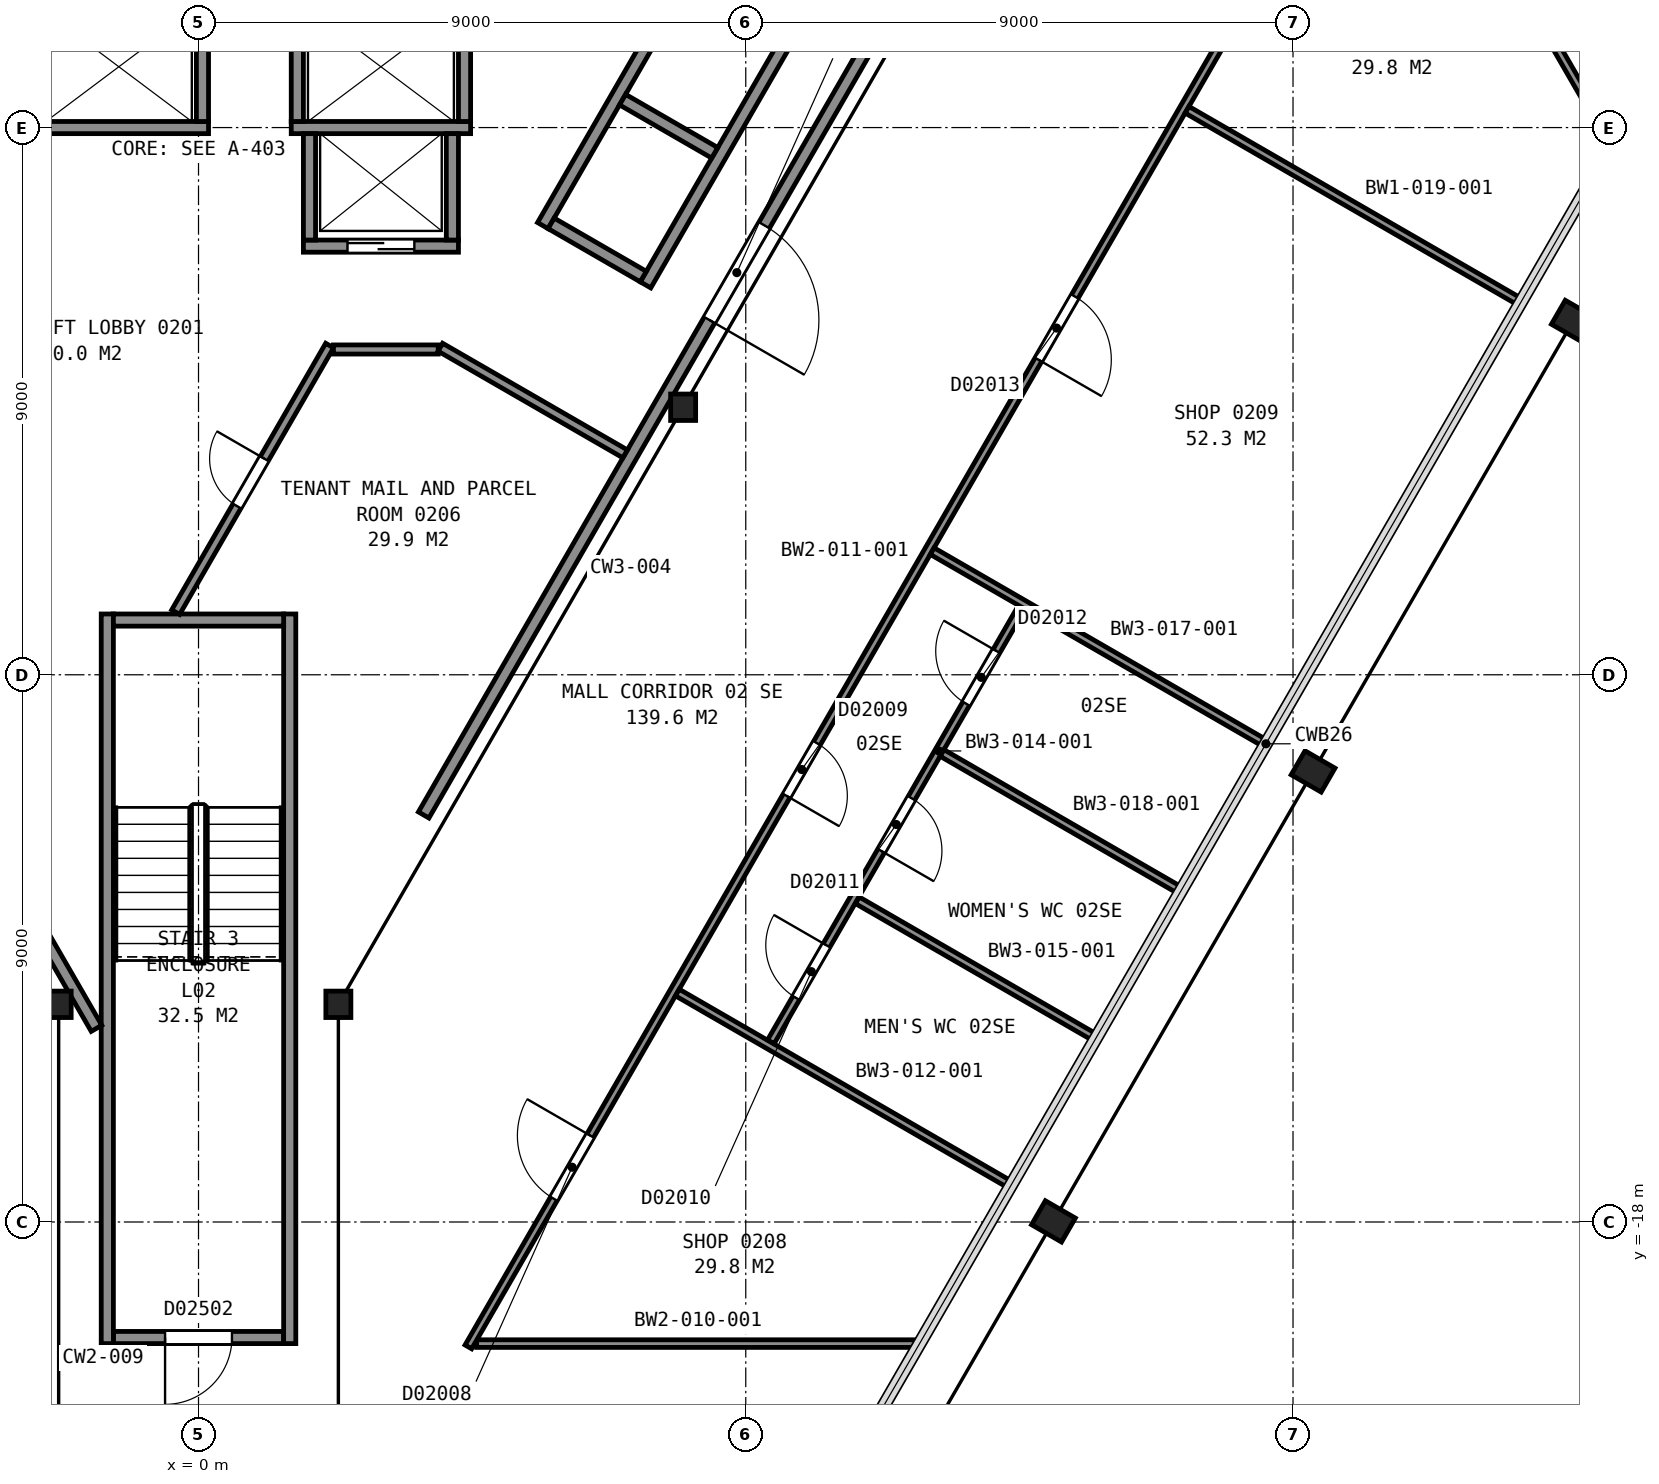
"""IFC4 building model, lengths in metres.
Left out: names, types, materials, properties, quantities, classifications, styles, units other than length and angle.
Written with IfcOpenShell. Run it as: python <this file> out.ifc"""

import sys

from ifc_helpers import new_model, si_unit, direction, frame, frame_2d, origin, origin_2d, place, context, subcontext, project, spatial, rectangle, i_section, extrude, element, fill, save


model = new_model("IFC4")
c1 = context("Model", 3, precision=1e-05, world=origin(), true_north=direction((0.0, 1.0)))
c2 = subcontext(c1, "Body", "Model", "MODEL_VIEW")
j1 = project(units=[si_unit("LENGTHUNIT", "METRE"), si_unit("PLANEANGLEUNIT", "RADIAN")], contexts=[c1])
p1 = place(None, origin())
s1 = spatial("IfcSite", under=j1, at=p1, CompositionType="ELEMENT")
p2 = place(p1, origin())
s2 = spatial("IfcBuilding", under=s1, at=p2, CompositionType="ELEMENT")
p3 = place(p2, frame((0.0, 0.0, 17.4)))
s3 = spatial("IfcBuildingStorey", under=s2, at=p3, CompositionType="ELEMENT", Elevation=17.4)
for number, where, z_axis, x_axis in (
    (1, (14.06, -17.99, -0.16), (0.0, 0.0, 1.0), (-0.5, -0.866, 0.0)),
    (2, (18.33, -10.59, -0.16), (0.0, 0.0, 1.0), (-0.5, -0.866, 0.0)),
    (3, (22.61, -3.18, -0.16), (0.0, 0.0, 1.0), (-0.5, -0.866, 0.0)),
):
    element("IfcColumn", number, at=place(p3, frame(where, z_axis=z_axis, x_axis=x_axis)), inside=s3, PredefinedType="COLUMN", context=c2, shape_type="SweptSolid", body=[
        extrude(i_section(OverallWidth=0.455, OverallDepth=0.569, WebThickness=0.078, FlangeThickness=0.125, FilletRadius=0.015, at=origin_2d()), origin(), (0.0, 0.0, 1.0), 5.16),
    ])
for number, where, z_axis, x_axis in (
    (4, (-2.3, -14.42, 0.0), (0.0, 0.0, 1.0), (1.0, 0.0, 0.0)),
    (5, (2.3, -14.42, 0.0), (0.0, 0.0, 1.0), (1.0, 0.0, 0.0)),
    (6, (7.97, -4.6, 0.0), (0.0, 0.0, 1.0), (1.0, 0.0, 0.0)),
):
    element("IfcColumn", number, at=place(p3, frame(where, z_axis=z_axis, x_axis=x_axis)), inside=s3, PredefinedType="COLUMN", context=c2, shape_type="SweptSolid", body=[
        extrude(i_section(OverallWidth=0.411, OverallDepth=0.434, WebThickness=0.036, FlangeThickness=0.057, FilletRadius=0.015, at=origin_2d()), origin(), (0.0, 0.0, 1.0), 5.0),
    ])
p4 = place(p3, frame((-1.4, -19.9, 0.0), z_axis=(0.0, 0.0, 1.0), x_axis=(1.0, 0.0, 0.0)))
e7 = element("IfcWall", 7, at=p4, inside=s3, PredefinedType="PARTITIONING", context=c2, shape_type="SweptSolid", body=[
    extrude(rectangle(XDim=2.8, YDim=0.2, at=frame_2d((1.4, 0.0))), origin(), (0.0, 0.0, 1.0), 4.75),
])
p5 = place(p4, frame((0.85, 0.0, 0.0)))
e8 = element("IfcOpeningElement", 8, at=p5, cuts=e7, PredefinedType="OPENING", context=c2, shape_type="SweptSolid", body=[
    extrude(rectangle(XDim=1.1, YDim=2.1, at=frame_2d((0.55, 1.05))), frame((0.0, 0.11, 0.0), z_axis=(0.0, -1.0, 0.0), x_axis=(1.0, 0.0, 0.0)), (0.0, 0.0, 1.0), 0.22),
])
for number, where, z_axis, x_axis in (
    (9, (1.5, -8.0, 0.0), (0.0, 0.0, 1.0), (0.0, -1.0, 0.0)),
    (10, (-1.5, -8.0, 0.0), (0.0, 0.0, 1.0), (0.0, -1.0, 0.0)),
):
    element("IfcWall", number, at=place(p3, frame(where, z_axis=z_axis, x_axis=x_axis)), inside=s3, PredefinedType="PARTITIONING", context=c2, shape_type="SweptSolid", body=[
        extrude(rectangle(XDim=12.0, YDim=0.2, at=frame_2d((6.0, 0.0))), origin(), (0.0, 0.0, 1.0), 4.75),
    ])
p6 = place(p3, frame((-1.4, -8.1, 0.0), z_axis=(0.0, 0.0, 1.0), x_axis=(1.0, 0.0, 0.0)))
e11 = element("IfcWall", 11, at=p6, inside=s3, PredefinedType="PARTITIONING", context=c2, shape_type="SweptSolid", body=[
    extrude(rectangle(XDim=2.8, YDim=0.2, at=frame_2d((1.4, 0.0))), origin(), (0.0, 0.0, 1.0), 4.75),
])
p7 = place(p3, frame((1.725, -1.95, 0.0), z_axis=(0.0, 0.0, 1.0), x_axis=(1.0, 0.0, 0.0)))
e12 = element("IfcWall", 12, at=p7, inside=s3, PredefinedType="PARTITIONING", context=c2, shape_type="SweptSolid", body=[
    extrude(rectangle(XDim=2.55, YDim=0.2, at=frame_2d((1.275, 0.0))), origin(), (0.0, 0.0, 1.0), 5.0),
])
p8 = place(p7, frame((0.725, 0.0, 0.0)))
e13 = element("IfcOpeningElement", 13, at=p8, cuts=e12, PredefinedType="OPENING", context=c2, shape_type="SweptSolid", body=[
    extrude(rectangle(XDim=1.1, YDim=2.1, at=frame_2d((0.55, 1.05))), frame((0.0, 0.11, 0.0), z_axis=(0.0, -1.0, 0.0), x_axis=(1.0, 0.0, 0.0)), (0.0, 0.0, 1.0), 0.22),
])
p9 = place(p3, frame((-2.785, 0.0, 0.0), z_axis=(0.0, 0.0, 1.0), x_axis=(1.0, 0.0, 0.0)))
e14 = element("IfcWall", 14, at=p9, inside=s3, PredefinedType="PARTITIONING", context=c2, shape_type="SweptSolid", body=[
    extrude(rectangle(XDim=2.95, YDim=0.2, at=frame_2d((1.475, 0.0))), origin(), (0.0, 0.0, 1.0), 5.0),
])
p10 = place(p3, frame((1.525, 0.0, 0.0), z_axis=(0.0, 0.0, 1.0), x_axis=(1.0, 0.0, 0.0)))
e15 = element("IfcWall", 15, at=p10, inside=s3, PredefinedType="PARTITIONING", context=c2, shape_type="SweptSolid", body=[
    extrude(rectangle(XDim=2.95, YDim=0.2, at=frame_2d((1.475, 0.0))), origin(), (0.0, 0.0, 1.0), 5.0),
])
p11 = place(p3, frame((7.351, -2.587, 0.0), z_axis=(0.0, 0.0, 1.0), x_axis=(0.500002801628, 0.866023786258, 0.0)))
e16 = element("IfcWall", 16, at=p11, inside=s3, PredefinedType="PARTITIONING", context=c2, shape_type="SweptSolid", body=[
    extrude(rectangle(XDim=4.9, YDim=0.2, at=frame_2d((2.45, 0.0))), origin(), (0.0, 0.0, 1.0), 5.0),
])
p12 = place(p3, frame((5.663, -1.612, 0.0), z_axis=(0.0, 0.0, 1.0), x_axis=(0.49998122708, 0.866036242063, 0.0)))
e17 = element("IfcWall", 17, at=p12, inside=s3, PredefinedType="PARTITIONING", context=c2, shape_type="SweptSolid", body=[
    extrude(rectangle(XDim=4.9, YDim=0.2, at=frame_2d((2.45, 0.0))), origin(), (0.0, 0.0, 1.0), 5.0),
])
p13 = place(p3, frame((4.375, 0.1, 0.0), z_axis=(0.0, 0.0, 1.0), x_axis=(0.0, 1.0, 0.0)))
e18 = element("IfcWall", 18, at=p13, inside=s3, PredefinedType="PARTITIONING", context=c2, shape_type="SweptSolid", body=[
    extrude(rectangle(XDim=1.95, YDim=0.2, at=frame_2d((0.975, 0.0))), origin(), (0.0, 0.0, 1.0), 5.0),
])
for number, where, z_axis, x_axis in (
    (19, (4.175, -1.85, 0.0), (0.0, 0.0, 1.0), (0.0, 1.0, 0.0)),
    (20, (1.825, -1.85, 0.0), (0.0, 0.0, 1.0), (0.0, 1.0, 0.0)),
):
    element("IfcWall", number, at=place(p3, frame(where, z_axis=z_axis, x_axis=x_axis)), inside=s3, PredefinedType="PARTITIONING", context=c2, shape_type="SweptSolid", body=[
        extrude(rectangle(XDim=1.75, YDim=0.2, at=frame_2d((0.875, 0.0))), origin(), (0.0, 0.0, 1.0), 5.0),
    ])
for number, where, z_axis, x_axis in (
    (21, (1.625, 0.1, 0.0), (0.0, 0.0, 1.0), (0.0, 1.0, 0.0)),
    (22, (0.065, 0.1, 0.0), (0.0, 0.0, 1.0), (0.0, 1.0, 0.0)),
):
    element("IfcWall", number, at=place(p3, frame(where, z_axis=z_axis, x_axis=x_axis)), inside=s3, PredefinedType="PARTITIONING", context=c2, shape_type="SweptSolid", body=[
        extrude(rectangle(XDim=1.95, YDim=0.2, at=frame_2d((0.975, 0.0))), origin(), (0.0, 0.0, 1.0), 5.0),
    ])
for number, where, z_axis, x_axis in (
    (23, (8.49, -0.416, 0.0), (0.0, 0.0, 1.0), (-0.866, 0.5, 0.0)),
    (24, (7.315, -2.451, 0.0), (0.0, 0.0, 1.0), (-0.866, 0.5, 0.0)),
):
    element("IfcWall", number, at=place(p3, frame(where, z_axis=z_axis, x_axis=x_axis)), inside=s3, PredefinedType="PARTITIONING", context=c2, shape_type="SweptSolid", body=[
        extrude(rectangle(XDim=1.75, YDim=0.2, at=frame_2d((0.875, 0.0))), origin(), (0.0, 0.0, 1.0), 5.0),
    ])
p14 = place(p3, frame((-4.914, -9.208, 0.0), z_axis=(0.0, 0.0, 1.0), x_axis=(0.499947703927, -0.866055594831, 0.0)))
e25 = element("IfcWall", 25, at=p14, inside=s3, PredefinedType="PARTITIONING", context=c2, shape_type="SweptSolid", body=[
    extrude(rectangle(XDim=6.474, YDim=0.2, at=frame_2d((3.237, 0.0))), origin(), (0.0, 0.0, 1.0), 4.75),
])
p15 = place(p3, frame((2.156, -3.585, 0.0), z_axis=(0.0, 0.0, 1.0), x_axis=(-0.500064700545, -0.865988045685, 0.0)))
e26 = element("IfcWall", 26, at=p15, inside=s3, PredefinedType="PARTITIONING", context=c2, shape_type="SweptSolid", body=[
    extrude(rectangle(XDim=5.063, YDim=0.15, at=frame_2d((2.532, 0.0))), origin(), (0.0, 0.0, 1.0), 4.75),
])
p16 = place(p15, frame((2.148, 0.0, 0.0)))
e27 = element("IfcOpeningElement", 27, at=p16, cuts=e26, PredefinedType="OPENING", context=c2, shape_type="SweptSolid", body=[
    extrude(rectangle(XDim=0.9, YDim=2.1, at=frame_2d((0.45, 1.05))), frame((0.0, 0.085, 0.0), z_axis=(0.0, -1.0, 0.0), x_axis=(1.0, 0.0, 0.0)), (0.0, 0.0, 1.0), 0.17),
])
p17 = place(p3, frame((2.219, -3.65, 0.0), z_axis=(0.0, 0.0, 1.0), x_axis=(1.0, 0.0, 0.0)))
e28 = element("IfcWall", 28, at=p17, inside=s3, PredefinedType="PARTITIONING", context=c2, shape_type="SweptSolid", body=[
    extrude(rectangle(XDim=1.723, YDim=0.15, at=frame_2d((0.861, 0.0))), origin(), (0.0, 0.0, 1.0), 4.75),
])
p18 = place(p3, frame((3.703, -11.306, 0.0), z_axis=(0.0, 0.0, 1.0), x_axis=(0.500006692285, 0.866021539957, 0.0)))
e29 = element("IfcWall", 29, at=p18, inside=s3, PredefinedType="PARTITIONING", context=c2, shape_type="SweptSolid", body=[
    extrude(rectangle(XDim=19.926, YDim=0.2, at=frame_2d((9.963, 0.0))), origin(), (0.0, 0.0, 1.0), 4.75),
])
p19 = place(p18, frame((9.4, 0.0, 0.0)))
e30 = element("IfcOpeningElement", 30, at=p19, cuts=e29, PredefinedType="OPENING", context=c2, shape_type="SweptSolid", body=[
    extrude(rectangle(XDim=1.8, YDim=2.1, at=frame_2d((0.9, 1.05))), frame((0.0, 0.11, 0.0), z_axis=(0.0, -1.0, 0.0), x_axis=(1.0, 0.0, 0.0)), (0.0, 0.0, 1.0), 0.22),
])
p20 = place(p3, frame((3.977, -3.613, 0.0), z_axis=(0.0, 0.0, 1.0), x_axis=(0.866068583921, -0.49992520235, 0.0)))
e31 = element("IfcWall", 31, at=p20, inside=s3, PredefinedType="PARTITIONING", context=c2, shape_type="SweptSolid", body=[
    extrude(rectangle(XDim=3.509, YDim=0.15, at=frame_2d((1.755, 0.0))), origin(), (0.0, 0.0, 1.0), 4.75),
])
p21 = place(p3, frame((4.574, -20.0, 0.0), z_axis=(0.0, 0.0, 1.0), x_axis=(1.0, 0.0, 0.0)))
e32 = element("IfcWall", 32, at=p21, inside=s3, PredefinedType="PARTITIONING", context=c2, shape_type="SweptSolid", body=[
    extrude(rectangle(XDim=7.285, YDim=0.125, at=frame_2d((3.643, 0.0))), origin(), (0.0, 0.0, 1.0), 4.84),
])
p22 = place(p3, frame((19.586, 6.184, 0.0), z_axis=(0.0, 0.0, 1.0), x_axis=(-0.499994028088, -0.866028851642, 0.0)))
e33 = element("IfcWall", 33, at=p22, inside=s3, PredefinedType="PARTITIONING", context=c2, shape_type="SweptSolid", body=[
    extrude(rectangle(XDim=30.297, YDim=0.125, at=frame_2d((15.148, 0.0))), origin(), (0.0, 0.0, 1.0), 3.853),
])
p23 = place(p22, frame((26.285, 0.0, 0.0)))
e34 = element("IfcOpeningElement", 34, at=p23, cuts=e33, PredefinedType="OPENING", context=c2, shape_type="SweptSolid", body=[
    extrude(rectangle(XDim=1.2, YDim=2.1, at=frame_2d((0.6, 1.05))), frame((0.0, 0.073, 0.0), z_axis=(0.0, -1.0, 0.0), x_axis=(1.0, 0.0, 0.0)), (0.0, 0.0, 1.0), 0.145),
])
p24 = place(p22, frame((18.832, 0.0, 0.0)))
e35 = element("IfcOpeningElement", 35, at=p24, cuts=e33, PredefinedType="OPENING", context=c2, shape_type="SweptSolid", body=[
    extrude(rectangle(XDim=1.0, YDim=2.1, at=frame_2d((0.5, 1.05))), frame((0.0, 0.073, 0.0), z_axis=(0.0, -1.0, 0.0), x_axis=(1.0, 0.0, 0.0)), (0.0, 0.0, 1.0), 0.145),
])
p25 = place(p22, frame((10.349, 0.0, 0.0)))
e36 = element("IfcOpeningElement", 36, at=p25, cuts=e33, PredefinedType="OPENING", context=c2, shape_type="SweptSolid", body=[
    extrude(rectangle(XDim=1.2, YDim=2.1, at=frame_2d((0.6, 1.05))), frame((0.0, 0.073, 0.0), z_axis=(0.0, -1.0, 0.0), x_axis=(1.0, 0.0, 0.0)), (0.0, 0.0, 1.0), 0.145),
])
p26 = place(p22, frame((2.817, 0.0, 0.0)))
e37 = element("IfcOpeningElement", 37, at=p26, cuts=e33, PredefinedType="OPENING", context=c2, shape_type="SweptSolid", body=[
    extrude(rectangle(XDim=1.2, YDim=2.1, at=frame_2d((0.6, 1.05))), frame((0.0, 0.073, 0.0), z_axis=(0.0, -1.0, 0.0), x_axis=(1.0, 0.0, 0.0)), (0.0, 0.0, 1.0), 0.145),
])
p27 = place(p3, frame((7.875, -14.226, 0.0), z_axis=(0.0, 0.0, 1.0), x_axis=(0.866003371142, -0.500038159714, 0.0)))
e38 = element("IfcWall", 38, at=p27, inside=s3, PredefinedType="PARTITIONING", context=c2, shape_type="SweptSolid", body=[
    extrude(rectangle(XDim=6.337, YDim=0.125, at=frame_2d((3.168, 0.0))), origin(), (0.0, 0.0, 1.0), 3.853),
])
p28 = place(p3, frame((13.54, -7.889, 0.0), z_axis=(0.0, 0.0, 1.0), x_axis=(-0.500033134207, -0.866006272896, 0.0)))
e39 = element("IfcWall", 39, at=p28, inside=s3, PredefinedType="PARTITIONING", context=c2, shape_type="SweptSolid", body=[
    extrude(rectangle(XDim=8.253, YDim=0.125, at=frame_2d((4.127, 0.0))), origin(), (0.0, 0.0, 1.0), 4.84),
])
p29 = place(p28, frame((6.421, 0.0, 0.0)))
e40 = element("IfcOpeningElement", 40, at=p29, cuts=e39, PredefinedType="OPENING", context=c2, shape_type="SweptSolid", body=[
    extrude(rectangle(XDim=1.0, YDim=2.1, at=frame_2d((0.5, 1.05))), frame((0.0, 0.073, 0.0), z_axis=(0.0, -1.0, 0.0), x_axis=(1.0, 0.0, 0.0)), (0.0, 0.0, 1.0), 0.145),
])
p30 = place(p28, frame((3.627, 0.0, 0.0)))
e41 = element("IfcOpeningElement", 41, at=p30, cuts=e39, PredefinedType="OPENING", context=c2, shape_type="SweptSolid", body=[
    extrude(rectangle(XDim=1.0, YDim=2.1, at=frame_2d((0.5, 1.05))), frame((0.0, 0.073, 0.0), z_axis=(0.0, -1.0, 0.0), x_axis=(1.0, 0.0, 0.0)), (0.0, 0.0, 1.0), 0.145),
])
p31 = place(p28, frame((0.832, 0.0, 0.0)))
e42 = element("IfcOpeningElement", 42, at=p31, cuts=e39, PredefinedType="OPENING", context=c2, shape_type="SweptSolid", body=[
    extrude(rectangle(XDim=1.0, YDim=2.1, at=frame_2d((0.5, 1.05))), frame((0.0, 0.073, 0.0), z_axis=(0.0, -1.0, 0.0), x_axis=(1.0, 0.0, 0.0)), (0.0, 0.0, 1.0), 0.145),
])
p32 = place(p3, frame((10.834, -12.709, 0.0), z_axis=(0.0, 0.0, 1.0), x_axis=(0.866030417568, -0.499991315771, 0.0)))
e43 = element("IfcWall", 43, at=p32, inside=s3, PredefinedType="PARTITIONING", context=c2, shape_type="SweptSolid", body=[
    extrude(rectangle(XDim=4.533, YDim=0.125, at=frame_2d((2.266, 0.0))), origin(), (0.0, 0.0, 1.0), 4.84),
])
p33 = place(p3, frame((12.066, -6.966, 0.0), z_axis=(0.0, 0.0, 1.0), x_axis=(0.86604189602, -0.499971433522, 0.0)))
e44 = element("IfcWall", 44, at=p33, inside=s3, PredefinedType="PARTITIONING", context=c2, shape_type="SweptSolid", body=[
    extrude(rectangle(XDim=6.338, YDim=0.125, at=frame_2d((3.169, 0.0))), origin(), (0.0, 0.0, 1.0), 3.853),
])
p34 = place(p3, frame((12.228, -10.286, 0.0), z_axis=(0.0, 0.0, 1.0), x_axis=(0.866009042838, -0.50002833692, 0.0)))
e45 = element("IfcWall", 45, at=p34, inside=s3, PredefinedType="PARTITIONING", context=c2, shape_type="SweptSolid", body=[
    extrude(rectangle(XDim=4.537, YDim=0.125, at=frame_2d((2.269, 0.0))), origin(), (0.0, 0.0, 1.0), 4.84),
])
p35 = place(p3, frame((16.257, 0.293, 0.0), z_axis=(0.0, 0.0, 1.0), x_axis=(0.866118237319, -0.499839173118, 0.0)))
e46 = element("IfcWall", 46, at=p35, inside=s3, PredefinedType="PARTITIONING", context=c2, shape_type="SweptSolid", body=[
    extrude(rectangle(XDim=6.337, YDim=0.125, at=frame_2d((3.169, 0.0))), origin(), (0.0, 0.0, 1.0), 3.853),
])
p36 = place(p3, frame((19.607, 6.039, 0.0), z_axis=(0.0, 0.0, 1.0), x_axis=(0.500002873931, -0.866023744513, 0.0)))
e47 = element("IfcWall", 47, at=p36, inside=s3, PredefinedType="PARTITIONING", context=c2, shape_type="SweptSolid", body=[
    extrude(rectangle(XDim=7.285, YDim=0.125, at=frame_2d((3.643, 0.0))), origin(), (0.0, 0.0, 1.0), 4.84),
])
p37 = place(p5, origin())
e48 = element("IfcDoor", 48, at=p37, inside=s3, OperationType="SINGLE_SWING_LEFT", PredefinedType="DOOR", context=c2, shape_type="SweptSolid", body=[
    extrude(rectangle(XDim=1.1, YDim=2.1, at=frame_2d((0.55, 1.05))), frame((0.0, 0.025, 0.0), z_axis=(0.0, -1.0, 0.0), x_axis=(1.0, 0.0, 0.0)), (0.0, 0.0, 1.0), 0.05),
])
fill(e8, e48)
p38 = place(p8, origin())
e49 = element("IfcDoor", 49, at=p38, inside=s3, OperationType="SLIDING_TO_RIGHT", PredefinedType="DOOR", context=c2, shape_type="SweptSolid", body=[
    extrude(rectangle(XDim=1.1, YDim=2.1, at=frame_2d((0.55, 1.05))), frame((0.0, 0.025, 0.0), z_axis=(0.0, -1.0, 0.0), x_axis=(1.0, 0.0, 0.0)), (0.0, 0.0, 1.0), 0.05),
])
fill(e13, e49)
p39 = place(p16, origin())
e50 = element("IfcDoor", 50, at=p39, inside=s3, OperationType="SINGLE_SWING_LEFT", PredefinedType="DOOR", context=c2, shape_type="SweptSolid", body=[
    extrude(rectangle(XDim=0.9, YDim=2.1, at=frame_2d((0.45, 1.05))), frame((0.0, 0.025, 0.0), z_axis=(0.0, -1.0, 0.0), x_axis=(1.0, 0.0, 0.0)), (0.0, 0.0, 1.0), 0.05),
])
fill(e27, e50)
p40 = place(p19, origin())
e51 = element("IfcDoor", 51, at=p40, inside=s3, OperationType="DOUBLE_DOOR_SINGLE_SWING", PredefinedType="DOOR", context=c2, shape_type="SweptSolid", body=[
    extrude(rectangle(XDim=1.8, YDim=2.1, at=frame_2d((0.9, 1.05))), frame((0.0, 0.025, 0.0), z_axis=(0.0, -1.0, 0.0), x_axis=(1.0, 0.0, 0.0)), (0.0, 0.0, 1.0), 0.05),
])
fill(e30, e51)
p41 = place(p23, origin())
e52 = element("IfcDoor", 52, at=p41, inside=s3, OperationType="SINGLE_SWING_LEFT", PredefinedType="DOOR", context=c2, shape_type="SweptSolid", body=[
    extrude(rectangle(XDim=1.2, YDim=2.1, at=frame_2d((0.6, 1.05))), frame((0.0, 0.025, 0.0), z_axis=(0.0, -1.0, 0.0), x_axis=(1.0, 0.0, 0.0)), (0.0, 0.0, 1.0), 0.05),
])
fill(e34, e52)
p42 = place(p24, origin())
e53 = element("IfcDoor", 53, at=p42, inside=s3, OperationType="SINGLE_SWING_RIGHT", PredefinedType="DOOR", context=c2, shape_type="SweptSolid", body=[
    extrude(rectangle(XDim=1.0, YDim=2.1, at=frame_2d((0.5, 1.05))), frame((0.0, 0.025, 0.0), z_axis=(0.0, -1.0, 0.0), x_axis=(1.0, 0.0, 0.0)), (0.0, 0.0, 1.0), 0.05),
])
fill(e35, e53)
p43 = place(p25, origin())
e54 = element("IfcDoor", 54, at=p43, inside=s3, OperationType="SINGLE_SWING_RIGHT", PredefinedType="DOOR", context=c2, shape_type="SweptSolid", body=[
    extrude(rectangle(XDim=1.2, YDim=2.1, at=frame_2d((0.6, 1.05))), frame((0.0, 0.025, 0.0), z_axis=(0.0, -1.0, 0.0), x_axis=(1.0, 0.0, 0.0)), (0.0, 0.0, 1.0), 0.05),
])
fill(e36, e54)
p44 = place(p29, origin())
e55 = element("IfcDoor", 55, at=p44, inside=s3, OperationType="SINGLE_SWING_LEFT", PredefinedType="DOOR", context=c2, shape_type="SweptSolid", body=[
    extrude(rectangle(XDim=1.0, YDim=2.1, at=frame_2d((0.5, 1.05))), frame((0.0, 0.025, 0.0), z_axis=(0.0, -1.0, 0.0), x_axis=(1.0, 0.0, 0.0)), (0.0, 0.0, 1.0), 0.05),
])
fill(e40, e55)
p45 = place(p30, origin())
e56 = element("IfcDoor", 56, at=p45, inside=s3, OperationType="SINGLE_SWING_RIGHT", PredefinedType="DOOR", context=c2, shape_type="SweptSolid", body=[
    extrude(rectangle(XDim=1.0, YDim=2.1, at=frame_2d((0.5, 1.05))), frame((0.0, 0.025, 0.0), z_axis=(0.0, -1.0, 0.0), x_axis=(1.0, 0.0, 0.0)), (0.0, 0.0, 1.0), 0.05),
])
fill(e41, e56)
p46 = place(p31, origin())
e57 = element("IfcDoor", 57, at=p46, inside=s3, OperationType="SINGLE_SWING_LEFT", PredefinedType="DOOR", context=c2, shape_type="SweptSolid", body=[
    extrude(rectangle(XDim=1.0, YDim=2.1, at=frame_2d((0.5, 1.05))), frame((0.0, 0.025, 0.0), z_axis=(0.0, -1.0, 0.0), x_axis=(1.0, 0.0, 0.0)), (0.0, 0.0, 1.0), 0.05),
])
fill(e42, e57)
save(model, sys.argv[1])
